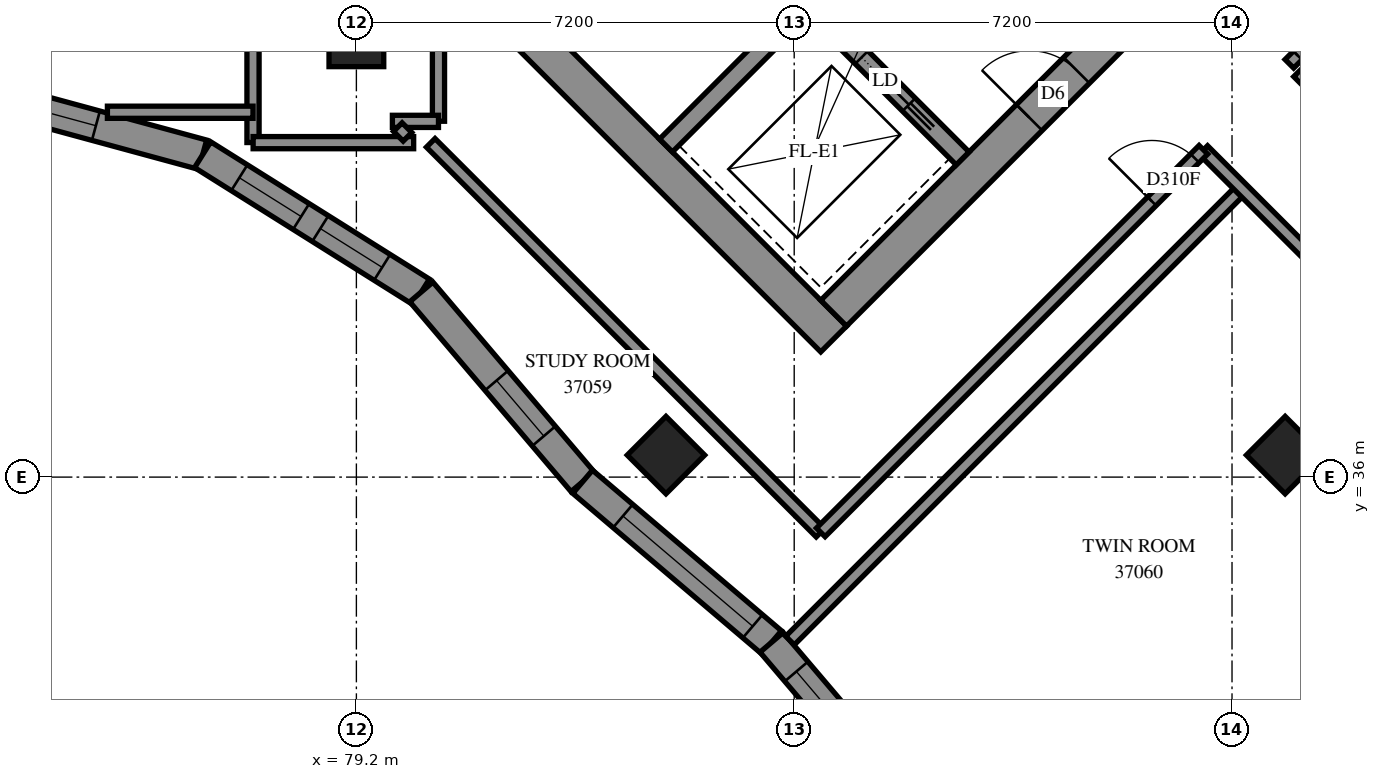
"""IFC4 building model, lengths in metres.
Left out: names, types, materials, properties, quantities, classifications, styles, units other than length and angle.
Written with IfcOpenShell. Run it as: python <this file> out.ifc"""

import sys

from ifc_helpers import new_model, si_unit, direction, frame, frame_2d, origin, origin_2d, place, context, subcontext, project, spatial, polyline, rectangle, outline, extrude, element, fill, save


model = new_model("IFC4")
c1 = context("Model", 3, precision=1e-05, world=origin(), true_north=direction((0.0, 1.0)))
c2 = subcontext(c1, "Body", "Model", "MODEL_VIEW")
j1 = project(units=[si_unit("LENGTHUNIT", "METRE"), si_unit("PLANEANGLEUNIT", "RADIAN")], contexts=[c1])
p1 = place(None, origin())
s1 = spatial("IfcSite", under=j1, at=p1, CompositionType="ELEMENT")
p2 = place(p1, origin())
s2 = spatial("IfcBuilding", under=s1, at=p2, CompositionType="ELEMENT")
p3 = place(p2, frame((0.0, 0.0, 138.8)))
s3 = spatial("IfcBuildingStorey", under=s2, at=p3, CompositionType="ELEMENT", Elevation=138.8)
for number, where, z_axis, x_axis in (
    (1, (79.2, 43.2, 0.0), (0.0, 0.0, 1.0), (1.0, 0.0, 0.0)),
    (2, (84.291, 36.362, 0.0), (0.0, 0.0, 1.0), (0.707, -0.707, 0.0)),
    (3, (94.474, 36.362, 0.0), (0.0, 0.0, 1.0), (0.707, -0.707, 0.0)),
):
    element("IfcColumn", number, at=place(p3, frame(where, z_axis=z_axis, x_axis=x_axis)), inside=s3, PredefinedType="COLUMN", context=c2, shape_type="SweptSolid", body=[
        extrude(rectangle(XDim=0.9, YDim=0.9, at=origin_2d()), origin(), (0.0, 0.0, 1.0), 3.1),
    ])
p4 = place(p3, frame((76.018, 49.302, -0.3), z_axis=(0.0, 0.0, 1.0), x_axis=(0.7071067812, -0.7071067812, 0.0)))
e4 = element("IfcWall", 4, at=p4, inside=s3, PredefinedType="SHEAR", context=c2, shape_type="SweptSolid", body=[
    extrude(rectangle(XDim=15.6, YDim=0.6, at=frame_2d((7.8, 0.0))), origin(), (0.0, 0.0, 1.0), 2.7),
])
p5 = place(p3, frame((87.049, 38.695, -0.3), z_axis=(0.0, 0.0, 1.0), x_axis=(0.7071067812, 0.7071067812, 0.0)))
e5 = element("IfcWall", 5, at=p5, inside=s3, PredefinedType="SHEAR", context=c2, shape_type="SweptSolid", body=[
    extrude(rectangle(XDim=14.4, YDim=0.6, at=frame_2d((7.2, 0.0))), origin(), (0.0, 0.0, 1.0), 2.7),
])
p6 = place(p5, frame((4.55, 0.0, 0.3)))
e6 = element("IfcOpeningElement", 6, at=p6, cuts=e5, PredefinedType="OPENING", context=c2, shape_type="SweptSolid", body=[
    extrude(rectangle(XDim=1.1, YDim=2.1, at=frame_2d((0.55, 1.05))), frame((0.0, 0.31, 0.0), z_axis=(0.0, -1.0, 0.0), x_axis=(1.0, 0.0, 0.0)), (0.0, 0.0, 1.0), 0.62),
])
p7 = place(p5, frame((11.35, 0.0, 0.3)))
e7 = element("IfcOpeningElement", 7, at=p7, cuts=e5, PredefinedType="OPENING", context=c2, shape_type="SweptSolid", body=[
    extrude(rectangle(XDim=1.1, YDim=2.1, at=frame_2d((0.55, 1.05))), frame((0.0, 0.31, 0.0), z_axis=(0.0, -1.0, 0.0), x_axis=(1.0, 0.0, 0.0)), (0.0, 0.0, 1.0), 0.62),
])
p8 = place(p3, frame((84.291, 41.453, 0.0), z_axis=(0.0, 0.0, 1.0), x_axis=(0.7071067812, 0.7071067812, 0.0)))
e8 = element("IfcWall", 8, at=p8, inside=s3, PredefinedType="SOLIDWALL", context=c2, shape_type="SweptSolid", body=[
    extrude(rectangle(XDim=3.3, YDim=0.3, at=frame_2d((1.65, 0.0))), origin(), (0.0, 0.0, 1.0), 3.1),
])
p9 = place(p3, frame((78.988, 51.423, 0.0), z_axis=(0.0, 0.0, 1.0), x_axis=(0.7071067812, -0.7071067812, 0.0)))
e9 = element("IfcWall", 9, at=p9, inside=s3, PredefinedType="SOLIDWALL", context=c2, shape_type="SweptSolid", body=[
    extrude(rectangle(XDim=14.4, YDim=0.3, at=frame_2d((7.2, 0.0))), origin(), (0.0, 0.0, 1.0), 3.1),
])
p10 = place(p9, frame((1.35, 0.0, 0.0)))
e10 = element("IfcOpeningElement", 10, at=p10, cuts=e9, PredefinedType="OPENING", context=c2, shape_type="SweptSolid", body=[
    extrude(rectangle(XDim=0.9, YDim=2.1, at=frame_2d((0.45, 1.05))), frame((0.0, 0.16, 0.0), z_axis=(0.0, -1.0, 0.0), x_axis=(1.0, 0.0, 0.0)), (0.0, 0.0, 1.0), 0.32),
])
p11 = place(p9, frame((4.95, 0.0, 0.0)))
e11 = element("IfcOpeningElement", 11, at=p11, cuts=e9, PredefinedType="OPENING", context=c2, shape_type="SweptSolid", body=[
    extrude(rectangle(XDim=0.9, YDim=2.1, at=frame_2d((0.45, 1.05))), frame((0.0, 0.16, 0.0), z_axis=(0.0, -1.0, 0.0), x_axis=(1.0, 0.0, 0.0)), (0.0, 0.0, 1.0), 0.32),
])
p12 = place(p9, frame((8.55, 0.0, 0.0)))
e12 = element("IfcOpeningElement", 12, at=p12, cuts=e9, PredefinedType="OPENING", context=c2, shape_type="SweptSolid", body=[
    extrude(rectangle(XDim=0.9, YDim=2.1, at=frame_2d((0.45, 1.05))), frame((0.0, 0.16, 0.0), z_axis=(0.0, -1.0, 0.0), x_axis=(1.0, 0.0, 0.0)), (0.0, 0.0, 1.0), 0.32),
])
p13 = place(p9, frame((12.05, 0.0, 0.0)))
e13 = element("IfcOpeningElement", 13, at=p13, cuts=e9, PredefinedType="OPENING", context=c2, shape_type="SweptSolid", body=[
    extrude(rectangle(XDim=1.1, YDim=2.1, at=frame_2d((0.55, 1.05))), frame((0.0, 0.16, 0.0), z_axis=(0.0, -1.0, 0.0), x_axis=(1.0, 0.0, 0.0)), (0.0, 0.0, 1.0), 0.32),
])
p14 = place(p3, frame((73.171, 42.253, 0.0), z_axis=(0.0, 0.0, 1.0), x_axis=(0.9649873507, -0.2622964218, 0.0)))
e14 = element("IfcWall", 14, at=p14, inside=s3, PredefinedType="SOLIDWALL", context=c2, shape_type="SweptSolid", body=[
    extrude(outline(polyline([(0.046, -0.25), (3.591, -0.25), (3.666, 0.25), (-0.046, 0.25), (0.046, -0.25)])), origin(), (0.0, 0.0, 1.0), 3.1),
])
p15 = place(p14, frame((0.609, 0.0, 0.45)))
e15 = element("IfcOpeningElement", 15, at=p15, cuts=e14, PredefinedType="OPENING", context=c2, shape_type="SweptSolid", body=[
    extrude(rectangle(XDim=1.2, YDim=2.5, at=frame_2d((0.6, 1.25))), frame((0.0, 0.26, 0.0), z_axis=(0.0, -1.0, 0.0), x_axis=(1.0, 0.0, 0.0)), (0.0, 0.0, 1.0), 0.52),
])
p16 = place(p3, frame((76.672, 41.301, 0.0), z_axis=(0.0, 0.0, 1.0), x_axis=(0.8470056686, -0.5315838574, 0.0)))
e16 = element("IfcWall", 16, at=p16, inside=s3, PredefinedType="SOLIDWALL", context=c2, shape_type="SweptSolid", body=[
    extrude(outline(polyline([(0.037, -0.25), (4.207, -0.25), (4.284, 0.25), (-0.037, 0.25), (0.037, -0.25)])), origin(), (0.0, 0.0, 1.0), 3.1),
])
p17 = place(p16, frame((0.712, 0.0, 0.45)))
e17 = element("IfcOpeningElement", 17, at=p17, cuts=e16, PredefinedType="OPENING", context=c2, shape_type="SweptSolid", body=[
    extrude(rectangle(XDim=1.2, YDim=2.5, at=frame_2d((0.6, 1.25))), frame((0.0, 0.26, 0.0), z_axis=(0.0, -1.0, 0.0), x_axis=(1.0, 0.0, 0.0)), (0.0, 0.0, 1.0), 0.52),
])
p18 = place(p16, frame((2.285, 0.0, 0.45)))
e18 = element("IfcOpeningElement", 18, at=p18, cuts=e16, PredefinedType="OPENING", context=c2, shape_type="SweptSolid", body=[
    extrude(rectangle(XDim=1.2, YDim=2.5, at=frame_2d((0.6, 1.25))), frame((0.0, 0.26, 0.0), z_axis=(0.0, -1.0, 0.0), x_axis=(1.0, 0.0, 0.0)), (0.0, 0.0, 1.0), 0.52),
])
p19 = place(p3, frame((80.268, 39.045, 0.0), z_axis=(0.0, 0.0, 1.0), x_axis=(0.6475669262, -0.76200858, 0.0)))
e19 = element("IfcWall", 19, at=p19, inside=s3, PredefinedType="SOLIDWALL", context=c2, shape_type="SweptSolid", body=[
    extrude(outline(polyline([(0.038, -0.25), (4.117, -0.25), (4.076, 0.25), (-0.038, 0.25), (0.038, -0.25)])), origin(), (0.0, 0.0, 1.0), 3.1),
])
p20 = place(p19, frame((1.911, 0.0, 0.45)))
e20 = element("IfcOpeningElement", 20, at=p20, cuts=e19, PredefinedType="OPENING", context=c2, shape_type="SweptSolid", body=[
    extrude(rectangle(XDim=1.2, YDim=2.5, at=frame_2d((0.6, 1.25))), frame((0.0, 0.26, 0.0), z_axis=(0.0, -1.0, 0.0), x_axis=(1.0, 0.0, 0.0)), (0.0, 0.0, 1.0), 0.52),
])
p21 = place(p3, frame((82.921, 35.923, 0.0), z_axis=(0.0, 0.0, 1.0), x_axis=(0.7620191747, -0.647554459, 0.0)))
e21 = element("IfcWall", 21, at=p21, inside=s3, PredefinedType="SOLIDWALL", context=c2, shape_type="SweptSolid", body=[
    extrude(outline(polyline([(-0.02, -0.25), (4.058, -0.25), (4.098, 0.25), (0.02, 0.25), (-0.02, -0.25)])), origin(), (0.0, 0.0, 1.0), 3.1),
])
p22 = place(p21, frame((0.87, 0.0, 0.45)))
e22 = element("IfcOpeningElement", 22, at=p22, cuts=e21, PredefinedType="OPENING", context=c2, shape_type="SweptSolid", body=[
    extrude(rectangle(XDim=2.8, YDim=2.5, at=frame_2d((1.4, 1.25))), frame((0.0, 0.26, 0.0), z_axis=(0.0, -1.0, 0.0), x_axis=(1.0, 0.0, 0.0)), (0.0, 0.0, 1.0), 0.52),
])
p23 = place(p3, frame((86.028, 33.282, 0.0), z_axis=(0.0, 0.0, 1.0), x_axis=(0.647554459, -0.7620191747, 0.0)))
e23 = element("IfcWall", 23, at=p23, inside=s3, PredefinedType="SOLIDWALL", context=c2, shape_type="SweptSolid", body=[
    extrude(outline(polyline([(0.02, -0.25), (4.098, -0.25), (4.058, 0.25), (-0.02, 0.25), (0.02, -0.25)])), origin(), (0.0, 0.0, 1.0), 3.1),
])
p24 = place(p23, frame((0.629, 0.0, 0.45)))
e24 = element("IfcOpeningElement", 24, at=p24, cuts=e23, PredefinedType="OPENING", context=c2, shape_type="SweptSolid", body=[
    extrude(rectangle(XDim=2.8, YDim=2.5, at=frame_2d((1.4, 1.25))), frame((0.0, 0.26, 0.0), z_axis=(0.0, -1.0, 0.0), x_axis=(1.0, 0.0, 0.0)), (0.0, 0.0, 1.0), 0.52),
])
p25 = place(p3, frame((86.331, 33.312, 0.0), z_axis=(0.0, 0.0, 1.0), x_axis=(0.7071067812, 0.7071067812, 0.0)))
e25 = element("IfcWall", 25, at=p25, inside=s3, PredefinedType="PARTITIONING", context=c2, shape_type="SweptSolid", body=[
    extrude(rectangle(XDim=10.514, YDim=0.2, at=frame_2d((5.257, 0.0))), origin(), (0.0, 0.0, 1.0), 3.1),
])
p26 = place(p3, frame((93.127, 41.379, 0.0), z_axis=(0.0, 0.0, 1.0), x_axis=(0.7071067812, -0.7071067812, 0.0)))
e26 = element("IfcWall", 26, at=p26, inside=s3, PredefinedType="PARTITIONING", context=c2, shape_type="SweptSolid", body=[
    extrude(rectangle(XDim=9.39, YDim=0.2, at=frame_2d((4.695, 0.0))), origin(), (0.0, 0.0, 1.0), 3.1),
])
p27 = place(p26, frame((3.2, 0.0, 0.0)))
e27 = element("IfcOpeningElement", 27, at=p27, cuts=e26, PredefinedType="OPENING", context=c2, shape_type="SweptSolid", body=[
    extrude(rectangle(XDim=0.9, YDim=2.1, at=frame_2d((0.45, 1.05))), frame((0.0, 0.11, 0.0), z_axis=(0.0, -1.0, 0.0), x_axis=(1.0, 0.0, 0.0)), (0.0, 0.0, 1.0), 0.22),
])
p28 = place(p3, frame((80.423, 41.497, 0.0), z_axis=(0.0, 0.0, 1.0), x_axis=(0.7071067812, -0.7071067812, 0.0)))
e28 = element("IfcWall", 28, at=p28, inside=s3, PredefinedType="PARTITIONING", context=c2, shape_type="SweptSolid", body=[
    extrude(rectangle(XDim=9.065, YDim=0.2, at=frame_2d((4.532, 0.0))), origin(), (0.0, 0.0, 1.0), 3.1),
])
p29 = place(p3, frame((94.543, 42.797, 0.0), z_axis=(0.0, 0.0, 1.0), x_axis=(0.7071067812, 0.7071067812, 0.0)))
e29 = element("IfcWall", 29, at=p29, inside=s3, PredefinedType="PARTITIONING", context=c2, shape_type="SweptSolid", body=[
    extrude(rectangle(XDim=8.901, YDim=0.2, at=frame_2d((4.45, 0.0))), origin(), (0.0, 0.0, 1.0), 3.1),
])
p30 = place(p29, frame((0.193, 0.0, 0.0)))
e30 = element("IfcOpeningElement", 30, at=p30, cuts=e29, PredefinedType="OPENING", context=c2, shape_type="SweptSolid", body=[
    extrude(rectangle(XDim=1.0, YDim=2.1, at=frame_2d((0.5, 1.05))), frame((0.0, 0.11, 0.0), z_axis=(0.0, -1.0, 0.0), x_axis=(1.0, 0.0, 0.0)), (0.0, 0.0, 1.0), 0.22),
])
p31 = place(p3, frame((86.837, 35.091, 0.0), z_axis=(0.0, 0.0, 1.0), x_axis=(0.7071067812, 0.7071067812, 0.0)))
e31 = element("IfcWall", 31, at=p31, inside=s3, PredefinedType="PARTITIONING", context=c2, shape_type="SweptSolid", body=[
    extrude(rectangle(XDim=8.898, YDim=0.2, at=frame_2d((4.449, 0.0))), origin(), (0.0, 0.0, 1.0), 3.1),
])
p32 = place(p31, frame((7.7, 0.0, 0.0)))
e32 = element("IfcOpeningElement", 32, at=p32, cuts=e31, PredefinedType="OPENING", context=c2, shape_type="SweptSolid", body=[
    extrude(rectangle(XDim=1.0, YDim=2.1, at=frame_2d((0.5, 1.05))), frame((0.0, 0.11, 0.0), z_axis=(0.0, -1.0, 0.0), x_axis=(1.0, 0.0, 0.0)), (0.0, 0.0, 1.0), 0.22),
])
p33 = place(p3, frame((91.391, 28.19, 0.0), z_axis=(0.0, 0.0, 1.0), x_axis=(0.7071067812, 0.7071067812, 0.0)))
e33 = element("IfcWall", 33, at=p33, inside=s3, PredefinedType="PARTITIONING", context=c2, shape_type="SweptSolid", body=[
    extrude(rectangle(XDim=8.158, YDim=0.2, at=frame_2d((4.079, 0.0))), origin(), (0.0, 0.0, 1.0), 3.1),
])
for number, where, z_axis, x_axis in (
    (34, (77.5, 41.502, 0.0), (0.0, 0.0, 1.0), (0.0, 1.0, 0.0)),
    (35, (77.502, 41.5, 0.0), (0.0, 0.0, 1.0), (1.0, 0.0, 0.0)),
):
    element("IfcWall", number, at=place(p3, frame(where, z_axis=z_axis, x_axis=x_axis)), inside=s3, PredefinedType="PARTITIONING", context=c2, shape_type="SweptSolid", body=[
        extrude(rectangle(XDim=2.64, YDim=0.2, at=frame_2d((1.32, 0.0))), origin(), (0.0, 0.0, 1.0), 3.1),
    ])
p34 = place(p3, frame((75.106, 42.0, 0.0), z_axis=(0.0, 0.0, 1.0), x_axis=(1.0, 0.0, 0.0)))
e36 = element("IfcWall", 36, at=p34, inside=s3, PredefinedType="PARTITIONING", context=c2, shape_type="SweptSolid", body=[
    extrude(rectangle(XDim=2.394, YDim=0.2, at=frame_2d((1.197, 0.0))), origin(), (0.0, 0.0, 1.0), 3.1),
])
p35 = place(p3, frame((80.55, 41.852, 0.0), z_axis=(0.0, 0.0, 1.0), x_axis=(0.0, 1.0, 0.0)))
e37 = element("IfcWall", 37, at=p35, inside=s3, PredefinedType="PARTITIONING", context=c2, shape_type="SweptSolid", body=[
    extrude(rectangle(XDim=2.38, YDim=0.2, at=frame_2d((1.19, 0.0))), origin(), (0.0, 0.0, 1.0), 3.1),
])
p36 = place(p3, frame((79.792, 41.85, 0.0), z_axis=(0.0, 0.0, 1.0), x_axis=(1.0, 0.0, 0.0)))
e38 = element("IfcWall", 38, at=p36, inside=s3, PredefinedType="PARTITIONING", context=c2, shape_type="SweptSolid", body=[
    extrude(rectangle(XDim=0.758, YDim=0.2, at=frame_2d((0.379, 0.0))), origin(), (0.0, 0.0, 1.0), 3.1),
])
p37 = place(p3, frame((94.686, 42.656, 0.0), z_axis=(0.0, 0.0, 1.0), x_axis=(0.7056768426, -0.7085338339, 0.0)))
e39 = element("IfcWall", 39, at=p37, inside=s3, PredefinedType="PARTITIONING", context=c2, shape_type="SweptSolid", body=[
    extrude(rectangle(XDim=0.7, YDim=0.2, at=frame_2d((0.35, 0.0))), origin(), (0.0, 0.0, 1.0), 3.1),
])
p38 = place(p3, frame((79.881, 41.755, 0.0), z_axis=(0.0, 0.0, 1.0), x_axis=(0.7071067812, -0.7071067812, 0.0)))
e40 = element("IfcWall", 40, at=p38, inside=s3, PredefinedType="PARTITIONING", context=c2, shape_type="SweptSolid", body=[
    extrude(rectangle(XDim=0.225, YDim=0.2, at=frame_2d((0.113, 0.0))), origin(), (0.0, 0.0, 1.0), 3.1),
])
p39 = place(p15, origin())
e41 = element("IfcWindow", 41, at=p39, inside=s3, PartitioningType="SINGLE_PANEL", PredefinedType="WINDOW", context=c2, shape_type="SweptSolid", body=[
    extrude(rectangle(XDim=1.2, YDim=2.5, at=frame_2d((0.6, 1.25))), frame((0.0, 0.18, 0.0), z_axis=(0.0, -1.0, 0.0), x_axis=(1.0, 0.0, 0.0)), (0.0, 0.0, 1.0), 0.06),
])
fill(e15, e41)
p40 = place(p17, origin())
e42 = element("IfcWindow", 42, at=p40, inside=s3, PartitioningType="SINGLE_PANEL", PredefinedType="WINDOW", context=c2, shape_type="SweptSolid", body=[
    extrude(rectangle(XDim=1.2, YDim=2.5, at=frame_2d((0.6, 1.25))), frame((0.0, 0.18, 0.0), z_axis=(0.0, -1.0, 0.0), x_axis=(1.0, 0.0, 0.0)), (0.0, 0.0, 1.0), 0.06),
])
fill(e17, e42)
p41 = place(p18, origin())
e43 = element("IfcWindow", 43, at=p41, inside=s3, PartitioningType="SINGLE_PANEL", PredefinedType="WINDOW", context=c2, shape_type="SweptSolid", body=[
    extrude(rectangle(XDim=1.2, YDim=2.5, at=frame_2d((0.6, 1.25))), frame((0.0, 0.18, 0.0), z_axis=(0.0, -1.0, 0.0), x_axis=(1.0, 0.0, 0.0)), (0.0, 0.0, 1.0), 0.06),
])
fill(e18, e43)
p42 = place(p20, origin())
e44 = element("IfcWindow", 44, at=p42, inside=s3, PartitioningType="SINGLE_PANEL", PredefinedType="WINDOW", context=c2, shape_type="SweptSolid", body=[
    extrude(rectangle(XDim=1.2, YDim=2.5, at=frame_2d((0.6, 1.25))), frame((0.0, 0.18, 0.0), z_axis=(0.0, -1.0, 0.0), x_axis=(1.0, 0.0, 0.0)), (0.0, 0.0, 1.0), 0.06),
])
fill(e20, e44)
p43 = place(p22, origin())
e45 = element("IfcWindow", 45, at=p43, inside=s3, PartitioningType="SINGLE_PANEL", PredefinedType="WINDOW", context=c2, shape_type="SweptSolid", body=[
    extrude(rectangle(XDim=2.8, YDim=2.5, at=frame_2d((1.4, 1.25))), frame((0.0, 0.18, 0.0), z_axis=(0.0, -1.0, 0.0), x_axis=(1.0, 0.0, 0.0)), (0.0, 0.0, 1.0), 0.06),
])
fill(e22, e45)
p44 = place(p24, origin())
e46 = element("IfcWindow", 46, at=p44, inside=s3, PartitioningType="SINGLE_PANEL", PredefinedType="WINDOW", context=c2, shape_type="SweptSolid", body=[
    extrude(rectangle(XDim=2.8, YDim=2.5, at=frame_2d((1.4, 1.25))), frame((0.0, 0.18, 0.0), z_axis=(0.0, -1.0, 0.0), x_axis=(1.0, 0.0, 0.0)), (0.0, 0.0, 1.0), 0.06),
])
fill(e24, e46)
p45 = place(p6, origin())
e47 = element("IfcDoor", 47, at=p45, inside=s3, OperationType="DOUBLE_DOOR_SINGLE_SWING", PredefinedType="DOOR", context=c2, shape_type="SweptSolid", body=[
    extrude(rectangle(XDim=1.1, YDim=2.1, at=frame_2d((0.55, 1.05))), frame((0.0, 0.025, 0.0), z_axis=(0.0, -1.0, 0.0), x_axis=(1.0, 0.0, 0.0)), (0.0, 0.0, 1.0), 0.05),
])
fill(e6, e47)
p46 = place(p13, origin())
e48 = element("IfcDoor", 48, at=p46, inside=s3, OperationType="SLIDING_TO_RIGHT", PredefinedType="DOOR", context=c2, shape_type="SweptSolid", body=[
    extrude(rectangle(XDim=1.1, YDim=2.1, at=frame_2d((0.55, 1.05))), frame((0.0, 0.025, 0.0), z_axis=(0.0, -1.0, 0.0), x_axis=(1.0, 0.0, 0.0)), (0.0, 0.0, 1.0), 0.05),
])
fill(e13, e48)
p47 = place(p30, origin())
e49 = element("IfcDoor", 49, at=p47, inside=s3, OperationType="SINGLE_SWING_LEFT", PredefinedType="DOOR", context=c2, shape_type="SweptSolid", body=[
    extrude(rectangle(XDim=1.0, YDim=2.1, at=frame_2d((0.5, 1.05))), frame((0.0, 0.025, 0.0), z_axis=(0.0, -1.0, 0.0), x_axis=(1.0, 0.0, 0.0)), (0.0, 0.0, 1.0), 0.05),
])
fill(e30, e49)
p48 = place(p32, origin())
e50 = element("IfcDoor", 50, at=p48, inside=s3, OperationType="SINGLE_SWING_LEFT", PredefinedType="DOOR", context=c2, shape_type="SweptSolid", body=[
    extrude(rectangle(XDim=1.0, YDim=2.1, at=frame_2d((0.5, 1.05))), frame((0.0, 0.025, 0.0), z_axis=(0.0, -1.0, 0.0), x_axis=(1.0, 0.0, 0.0)), (0.0, 0.0, 1.0), 0.05),
])
fill(e32, e50)
save(model, sys.argv[1])
